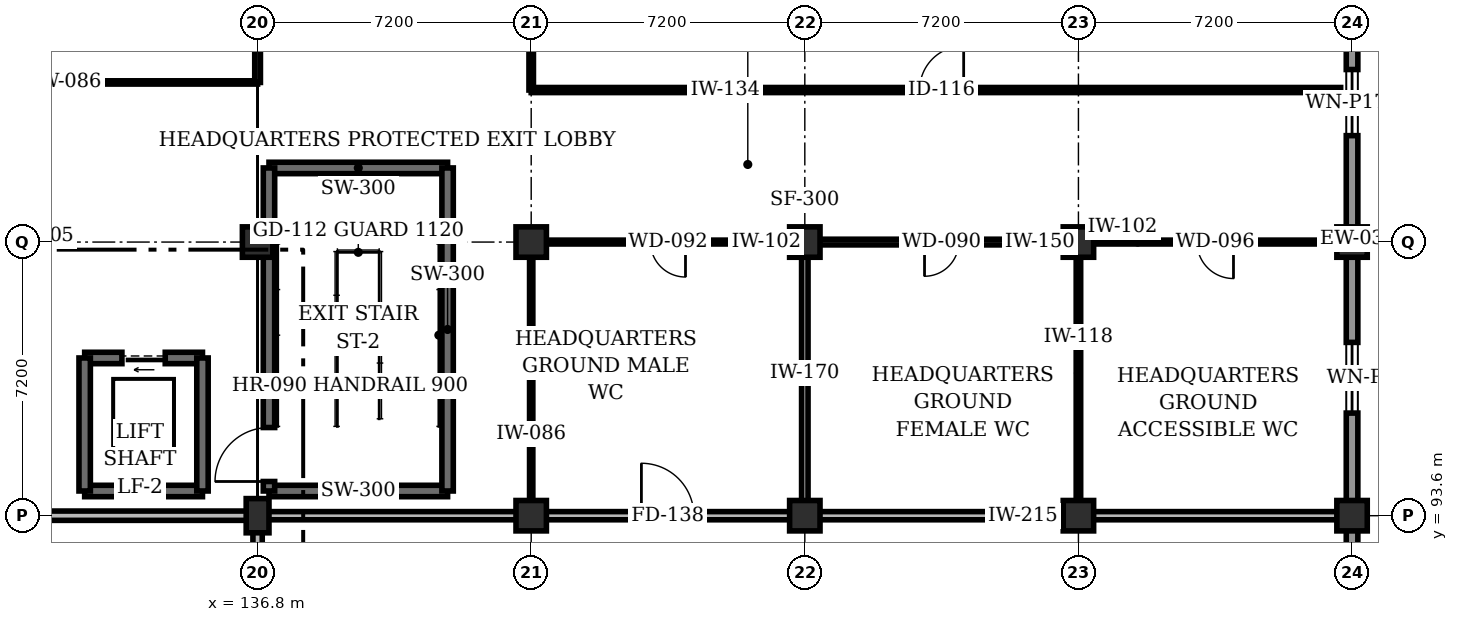
"""IFC4 building model, lengths in metres.
Left out: names, types, materials, properties, quantities, classifications, styles, units other than length and angle.
Written with IfcOpenShell. Run it as: python <this file> out.ifc"""

import sys

from ifc_helpers import new_model, si_unit, direction, frame, frame_2d, origin, origin_2d, place, context, subcontext, project, spatial, rectangle, extrude, element, fill, save


model = new_model("IFC4")
c1 = context("Model", 3, precision=1e-05, world=origin(), true_north=direction((0.0, 1.0)))
c2 = subcontext(c1, "Body", "Model", "MODEL_VIEW")
j1 = project(units=[si_unit("LENGTHUNIT", "METRE"), si_unit("PLANEANGLEUNIT", "RADIAN")], contexts=[c1])
p1 = place(None, origin())
s1 = spatial("IfcSite", under=j1, at=p1, CompositionType="ELEMENT")
p2 = place(p1, origin())
s2 = spatial("IfcBuilding", under=s1, at=p2, CompositionType="ELEMENT")
p3 = place(p2, origin())
s3 = spatial("IfcBuildingStorey", under=s2, at=p3, CompositionType="ELEMENT", Elevation=0.0)
p4 = place(p3, frame((136.8, 93.6, 0.0), z_axis=(0.0, 0.0, 1.0), x_axis=(1.0, 0.0, 0.0)))
e1 = element("IfcColumn", 1, at=p4, inside=s3, PredefinedType="PILASTER", context=c2, shape_type="SweptSolid", body=[
    extrude(rectangle(XDim=0.6, YDim=0.9, at=origin_2d()), origin(), (0.0, 0.0, 1.0), 6.0),
])
for number, where, z_axis, x_axis in (
    (2, (136.8, 100.8, 0.0), (0.0, 0.0, 1.0), (1.0, 0.0, 0.0)),
    (3, (144.0, 93.6, 0.0), (0.0, 0.0, 1.0), (1.0, 0.0, 0.0)),
    (4, (144.0, 100.8, 0.0), (0.0, 0.0, 1.0), (1.0, 0.0, 0.0)),
    (5, (151.2, 93.6, 0.0), (0.0, 0.0, 1.0), (1.0, 0.0, 0.0)),
    (6, (151.2, 100.8, 0.0), (0.0, 0.0, 1.0), (1.0, 0.0, 0.0)),
    (7, (158.4, 93.6, 0.0), (0.0, 0.0, 1.0), (1.0, 0.0, 0.0)),
    (8, (158.4, 100.8, 0.0), (0.0, 0.0, 1.0), (1.0, 0.0, 0.0)),
    (9, (165.6, 93.6, 0.0), (0.0, 0.0, 1.0), (1.0, 0.0, 0.0)),
    (10, (165.6, 100.8, 0.0), (0.0, 0.0, 1.0), (1.0, 0.0, 0.0)),
):
    element("IfcColumn", number, at=place(p3, frame(where, z_axis=z_axis, x_axis=x_axis)), inside=s3, PredefinedType="COLUMN", context=c2, shape_type="SweptSolid", body=[
        extrude(rectangle(XDim=0.8, YDim=0.8, at=origin_2d()), origin(), (0.0, 0.0, 1.0), 6.0),
    ])
p5 = place(p3, frame((165.6, 93.6, 0.0), z_axis=(0.0, 0.0, 1.0), x_axis=(0.0, 1.0, 0.0)))
e11 = element("IfcWall", 11, at=p5, inside=s3, PredefinedType="STANDARD", context=c2, shape_type="SweptSolid", body=[
    extrude(rectangle(XDim=16.6, YDim=0.305, at=frame_2d((8.3, 0.0))), origin(), (0.0, 0.0, 1.0), 5.05),
])
p6 = place(p5, frame((2.7, 0.0, 1.2)))
e12 = element("IfcOpeningElement", 12, at=p6, cuts=e11, PredefinedType="OPENING", context=c2, shape_type="SweptSolid", body=[
    extrude(rectangle(XDim=1.86, YDim=1.68, at=frame_2d((0.93, 0.84))), frame((0.0, 0.162, 0.0), z_axis=(0.0, -1.0, 0.0), x_axis=(1.0, 0.0, 0.0)), (0.0, 0.0, 1.0), 0.325),
])
p7 = place(p5, frame((10.0, 0.0, 1.2)))
e13 = element("IfcOpeningElement", 13, at=p7, cuts=e11, PredefinedType="OPENING", context=c2, shape_type="SweptSolid", body=[
    extrude(rectangle(XDim=1.74, YDim=1.64, at=frame_2d((0.87, 0.82))), frame((0.0, 0.162, 0.0), z_axis=(0.0, -1.0, 0.0), x_axis=(1.0, 0.0, 0.0)), (0.0, 0.0, 1.0), 0.325),
])
p8 = place(p3, frame((165.6, 93.6, 0.0), z_axis=(0.0, 0.0, 1.0), x_axis=(0.0, -1.0, 0.0)))
e14 = element("IfcWall", 14, at=p8, inside=s3, PredefinedType="STANDARD", context=c2, shape_type="SweptSolid", body=[
    extrude(rectangle(XDim=50.4, YDim=0.305, at=frame_2d((25.2, 0.0))), origin(), (0.0, 0.0, 1.0), 5.022),
])
p9 = place(p8, frame((44.78, 0.0, 0.0)))
e15 = element("IfcOpeningElement", 15, at=p9, cuts=e14, PredefinedType="OPENING", context=c2, shape_type="SweptSolid", body=[
    extrude(rectangle(XDim=1.82, YDim=2.34, at=frame_2d((0.91, 1.17))), frame((0.0, 0.162, 0.0), z_axis=(0.0, -1.0, 0.0), x_axis=(1.0, 0.0, 0.0)), (0.0, 0.0, 1.0), 0.325),
])
p10 = place(p8, frame((24.22, 0.0, 0.0)))
e16 = element("IfcOpeningElement", 16, at=p10, cuts=e14, PredefinedType="OPENING", context=c2, shape_type="SweptSolid", body=[
    extrude(rectangle(XDim=1.88, YDim=2.36, at=frame_2d((0.94, 1.18))), frame((0.0, 0.162, 0.0), z_axis=(0.0, -1.0, 0.0), x_axis=(1.0, 0.0, 0.0)), (0.0, 0.0, 1.0), 0.325),
])
p11 = place(p8, frame((38.0, 0.0, 2.2)))
e17 = element("IfcOpeningElement", 17, at=p11, cuts=e14, PredefinedType="OPENING", context=c2, shape_type="SweptSolid", body=[
    extrude(rectangle(XDim=3.2, YDim=1.4, at=frame_2d((1.6, 0.7))), frame((0.0, 0.162, 0.0), z_axis=(0.0, -1.0, 0.0), x_axis=(1.0, 0.0, 0.0)), (0.0, 0.0, 1.0), 0.325),
])
p12 = place(p8, frame((18.68, 0.0, 2.2)))
e18 = element("IfcOpeningElement", 18, at=p12, cuts=e14, PredefinedType="OPENING", context=c2, shape_type="SweptSolid", body=[
    extrude(rectangle(XDim=2.12, YDim=1.76, at=frame_2d((1.06, 0.88))), frame((0.0, 0.162, 0.0), z_axis=(0.0, -1.0, 0.0), x_axis=(1.0, 0.0, 0.0)), (0.0, 0.0, 1.0), 0.325),
])
p13 = place(p8, frame((15.68, 0.0, 2.2)))
e19 = element("IfcOpeningElement", 19, at=p13, cuts=e14, PredefinedType="OPENING", context=c2, shape_type="SweptSolid", body=[
    extrude(rectangle(XDim=2.12, YDim=1.76, at=frame_2d((1.06, 0.88))), frame((0.0, 0.162, 0.0), z_axis=(0.0, -1.0, 0.0), x_axis=(1.0, 0.0, 0.0)), (0.0, 0.0, 1.0), 0.325),
])
p14 = place(p8, frame((4.28, 0.0, 2.2)))
e20 = element("IfcOpeningElement", 20, at=p14, cuts=e14, PredefinedType="OPENING", context=c2, shape_type="SweptSolid", body=[
    extrude(rectangle(XDim=2.12, YDim=1.76, at=frame_2d((1.06, 0.88))), frame((0.0, 0.162, 0.0), z_axis=(0.0, -1.0, 0.0), x_axis=(1.0, 0.0, 0.0)), (0.0, 0.0, 1.0), 0.325),
])
p15 = place(p8, frame((1.28, 0.0, 2.2)))
e21 = element("IfcOpeningElement", 21, at=p15, cuts=e14, PredefinedType="OPENING", context=c2, shape_type="SweptSolid", body=[
    extrude(rectangle(XDim=2.12, YDim=1.76, at=frame_2d((1.06, 0.88))), frame((0.0, 0.162, 0.0), z_axis=(0.0, -1.0, 0.0), x_axis=(1.0, 0.0, 0.0)), (0.0, 0.0, 1.0), 0.325),
])
for number, where, z_axis, x_axis in (
    (22, (137.1, 94.25, 0.0), (0.0, 0.0, 1.0), (1.0, 0.0, 0.0)),
    (23, (141.8, 102.75, 0.0), (0.0, 0.0, 1.0), (-1.0, 0.0, 0.0)),
):
    element("IfcWall", number, at=place(p3, frame(where, z_axis=z_axis, x_axis=x_axis)), inside=s3, PredefinedType="SHEAR", context=c2, shape_type="SweptSolid", body=[
        extrude(rectangle(XDim=4.7, YDim=0.3, at=frame_2d((2.35, 0.0))), origin(), (0.0, 0.0, 1.0), 5.715),
    ])
p16 = place(p3, frame((137.1, 94.25, 0.0), z_axis=(0.0, 0.0, 1.0), x_axis=(0.0, 1.0, 0.0)))
e24 = element("IfcWall", 24, at=p16, inside=s3, PredefinedType="SHEAR", context=c2, shape_type="SweptSolid", body=[
    extrude(rectangle(XDim=8.5, YDim=0.3, at=frame_2d((4.25, 0.0))), origin(), (0.0, 0.0, 1.0), 5.715),
])
p17 = place(p16, frame((0.25, 0.0, 0.0)))
e25 = element("IfcOpeningElement", 25, at=p17, cuts=e24, PredefinedType="OPENING", context=c2, shape_type="SweptSolid", body=[
    extrude(rectangle(XDim=1.42, YDim=2.22, at=frame_2d((0.71, 1.11))), frame((0.0, 0.16, 0.0), z_axis=(0.0, -1.0, 0.0), x_axis=(1.0, 0.0, 0.0)), (0.0, 0.0, 1.0), 0.32),
])
p18 = place(p3, frame((141.8, 102.75, 0.0), z_axis=(0.0, 0.0, 1.0), x_axis=(0.0, -1.0, 0.0)))
e26 = element("IfcWall", 26, at=p18, inside=s3, PredefinedType="SHEAR", context=c2, shape_type="SweptSolid", body=[
    extrude(rectangle(XDim=8.5, YDim=0.3, at=frame_2d((4.25, 0.0))), origin(), (0.0, 0.0, 1.0), 5.715),
])
p19 = place(p3, frame((132.25, 94.25, 0.0), z_axis=(0.0, 0.0, 1.0), x_axis=(1.0, 0.0, 0.0)))
e27 = element("IfcWall", 27, at=p19, inside=s3, PredefinedType="SHEAR", context=c2, shape_type="SweptSolid", body=[
    extrude(rectangle(XDim=3.1, YDim=0.3, at=frame_2d((1.55, 0.0))), origin(), (0.0, 0.0, 1.0), 5.715),
])
p20 = place(p3, frame((135.35, 97.75, 0.0), z_axis=(0.0, 0.0, 1.0), x_axis=(-1.0, 0.0, 0.0)))
e28 = element("IfcWall", 28, at=p20, inside=s3, PredefinedType="SHEAR", context=c2, shape_type="SweptSolid", body=[
    extrude(rectangle(XDim=3.1, YDim=0.3, at=frame_2d((1.55, 0.0))), origin(), (0.0, 0.0, 1.0), 5.715),
])
p21 = place(p20, frame((0.98, 0.0, 0.0)))
e29 = element("IfcOpeningElement", 29, at=p21, cuts=e28, PredefinedType="OPENING", context=c2, shape_type="SweptSolid", body=[
    extrude(rectangle(XDim=1.14, YDim=2.24, at=frame_2d((0.57, 1.12))), frame((0.0, 0.16, 0.0), z_axis=(0.0, -1.0, 0.0), x_axis=(1.0, 0.0, 0.0)), (0.0, 0.0, 1.0), 0.32),
])
for number, where, z_axis, x_axis in (
    (30, (132.25, 97.75, 0.0), (0.0, 0.0, 1.0), (0.0, -1.0, 0.0)),
    (31, (135.35, 94.25, 0.0), (0.0, 0.0, 1.0), (0.0, 1.0, 0.0)),
):
    element("IfcWall", number, at=place(p3, frame(where, z_axis=z_axis, x_axis=x_axis)), inside=s3, PredefinedType="SHEAR", context=c2, shape_type="SweptSolid", body=[
        extrude(rectangle(XDim=3.5, YDim=0.3, at=frame_2d((1.75, 0.0))), origin(), (0.0, 0.0, 1.0), 5.715),
    ])
p22 = place(p3, frame((115.2, 93.6, 0.0), z_axis=(0.0, 0.0, 1.0), x_axis=(1.0, 0.0, 0.0)))
e32 = element("IfcWall", 32, at=p22, inside=s3, PredefinedType="STANDARD", context=c2, shape_type="SweptSolid", body=[
    extrude(rectangle(XDim=21.6, YDim=0.245, at=frame_2d((10.8, 0.0))), origin(), (0.0, 0.0, 1.0), 5.022),
])
p23 = place(p22, frame((11.32, 0.0, 0.0)))
e33 = element("IfcOpeningElement", 33, at=p23, cuts=e32, PredefinedType="OPENING", context=c2, shape_type="SweptSolid", body=[
    extrude(rectangle(XDim=1.52, YDim=2.26, at=frame_2d((0.76, 1.13))), frame((0.0, 0.133, 0.0), z_axis=(0.0, -1.0, 0.0), x_axis=(1.0, 0.0, 0.0)), (0.0, 0.0, 1.0), 0.265),
])
p24 = place(p3, frame((136.8, 57.6, 0.0), z_axis=(0.0, 0.0, 1.0), x_axis=(0.0, 1.0, 0.0)))
e34 = element("IfcWall", 34, at=p24, inside=s3, PredefinedType="STANDARD", context=c2, shape_type="SweptSolid", body=[
    extrude(rectangle(XDim=36.0, YDim=0.245, at=frame_2d((18.0, 0.0))), origin(), (0.0, 0.0, 1.0), 5.022),
])
p25 = place(p24, frame((9.97, 0.0, 0.0)))
e35 = element("IfcOpeningElement", 35, at=p25, cuts=e34, PredefinedType="OPENING", context=c2, shape_type="SweptSolid", body=[
    extrude(rectangle(XDim=1.66, YDim=2.3, at=frame_2d((0.83, 1.15))), frame((0.0, 0.133, 0.0), z_axis=(0.0, -1.0, 0.0), x_axis=(1.0, 0.0, 0.0)), (0.0, 0.0, 1.0), 0.265),
])
p26 = place(p3, frame((136.8, 93.6, 0.0), z_axis=(0.0, 0.0, 1.0), x_axis=(1.0, 0.0, 0.0)))
e36 = element("IfcWall", 36, at=p26, inside=s3, PredefinedType="STANDARD", context=c2, shape_type="SweptSolid", body=[
    extrude(rectangle(XDim=28.8, YDim=0.215, at=frame_2d((14.4, 0.0))), origin(), (0.0, 0.0, 1.0), 5.022),
])
p27 = place(p26, frame((10.1, 0.0, 0.0)))
e37 = element("IfcOpeningElement", 37, at=p27, cuts=e36, PredefinedType="OPENING", context=c2, shape_type="SweptSolid", body=[
    extrude(rectangle(XDim=1.38, YDim=2.24, at=frame_2d((0.69, 1.12))), frame((0.0, 0.117, 0.0), z_axis=(0.0, -1.0, 0.0), x_axis=(1.0, 0.0, 0.0)), (0.0, 0.0, 1.0), 0.235),
])
p28 = place(p3, frame((122.4, 105.0, 0.0), z_axis=(0.0, 0.0, 1.0), x_axis=(1.0, 0.0, 0.0)))
e38 = element("IfcWall", 38, at=p28, inside=s3, PredefinedType="STANDARD", context=c2, shape_type="SweptSolid", body=[
    extrude(rectangle(XDim=14.4, YDim=0.086, at=frame_2d((7.2, 0.0))), origin(), (0.0, 0.0, 1.0), 5.103),
])
p29 = place(p28, frame((2.85, 0.0, 0.0)))
e39 = element("IfcOpeningElement", 39, at=p29, cuts=e38, PredefinedType="OPENING", context=c2, shape_type="SweptSolid", body=[
    extrude(rectangle(XDim=1.5, YDim=2.26, at=frame_2d((0.75, 1.13))), frame((0.0, 0.053, 0.0), z_axis=(0.0, -1.0, 0.0), x_axis=(1.0, 0.0, 0.0)), (0.0, 0.0, 1.0), 0.106),
])
p30 = place(p3, frame((136.8, 105.0, 0.0), z_axis=(0.0, 0.0, 1.0), x_axis=(0.0, 1.0, 0.0)))
e40 = element("IfcWall", 40, at=p30, inside=s3, PredefinedType="STANDARD", context=c2, shape_type="SweptSolid", body=[
    extrude(rectangle(XDim=4.9, YDim=0.15, at=frame_2d((2.45, 0.0))), origin(), (0.0, 0.0, 1.0), 5.022),
])
p31 = place(p3, frame((144.0, 104.8, 0.0), z_axis=(0.0, 0.0, 1.0), x_axis=(1.0, 0.0, 0.0)))
e41 = element("IfcWall", 41, at=p31, inside=s3, PredefinedType="STANDARD", context=c2, shape_type="SweptSolid", body=[
    extrude(rectangle(XDim=21.3, YDim=0.134, at=frame_2d((10.65, 0.0))), origin(), (0.0, 0.0, 1.0), 5.103),
])
p32 = place(p31, frame((10.22, 0.0, 0.0)))
e42 = element("IfcOpeningElement", 42, at=p32, cuts=e41, PredefinedType="OPENING", context=c2, shape_type="SweptSolid", body=[
    extrude(rectangle(XDim=1.16, YDim=2.22, at=frame_2d((0.58, 1.11))), frame((0.0, 0.077, 0.0), z_axis=(0.0, -1.0, 0.0), x_axis=(1.0, 0.0, 0.0)), (0.0, 0.0, 1.0), 0.154),
])
p33 = place(p3, frame((144.0, 109.9, 0.0), z_axis=(0.0, 0.0, 1.0), x_axis=(0.0, -1.0, 0.0)))
e43 = element("IfcWall", 43, at=p33, inside=s3, PredefinedType="STANDARD", context=c2, shape_type="SweptSolid", body=[
    extrude(rectangle(XDim=5.1, YDim=0.118, at=frame_2d((2.55, 0.0))), origin(), (0.0, 0.0, 1.0), 5.022),
])
p34 = place(p3, frame((151.2, 100.8, 0.0), z_axis=(0.0, 0.0, 1.0), x_axis=(-1.0, 0.0, 0.0)))
e44 = element("IfcWall", 44, at=p34, inside=s3, PredefinedType="STANDARD", context=c2, shape_type="SweptSolid", body=[
    extrude(rectangle(XDim=7.2, YDim=0.102, at=frame_2d((3.6, 0.0))), origin(), (0.0, 0.0, 1.0), 5.022),
])
p35 = place(p34, frame((3.14, 0.0, 0.0)))
e45 = element("IfcOpeningElement", 45, at=p35, cuts=e44, PredefinedType="OPENING", context=c2, shape_type="SweptSolid", body=[
    extrude(rectangle(XDim=0.92, YDim=2.1, at=frame_2d((0.46, 1.05))), frame((0.0, 0.061, 0.0), z_axis=(0.0, -1.0, 0.0), x_axis=(1.0, 0.0, 0.0)), (0.0, 0.0, 1.0), 0.122),
])
p36 = place(p3, frame((144.0, 100.8, 0.0), z_axis=(0.0, 0.0, 1.0), x_axis=(0.0, -1.0, 0.0)))
e46 = element("IfcWall", 46, at=p36, inside=s3, PredefinedType="STANDARD", context=c2, shape_type="SweptSolid", body=[
    extrude(rectangle(XDim=6.9, YDim=0.086, at=frame_2d((3.45, 0.0))), origin(), (0.0, 0.0, 1.0), 5.022),
])
p37 = place(p3, frame((151.2, 93.9, 0.0), z_axis=(0.0, 0.0, 1.0), x_axis=(0.0, 1.0, 0.0)))
e47 = element("IfcWall", 47, at=p37, inside=s3, PredefinedType="STANDARD", context=c2, shape_type="SweptSolid", body=[
    extrude(rectangle(XDim=6.9, YDim=0.17, at=frame_2d((3.45, 0.0))), origin(), (0.0, 0.0, 1.0), 5.022),
])
p38 = place(p3, frame((158.4, 100.8, 0.0), z_axis=(0.0, 0.0, 1.0), x_axis=(-1.0, 0.0, 0.0)))
e48 = element("IfcWall", 48, at=p38, inside=s3, PredefinedType="STANDARD", context=c2, shape_type="SweptSolid", body=[
    extrude(rectangle(XDim=7.2, YDim=0.15, at=frame_2d((3.6, 0.0))), origin(), (0.0, 0.0, 1.0), 5.022),
])
p39 = place(p38, frame((3.15, 0.0, 0.0)))
e49 = element("IfcOpeningElement", 49, at=p39, cuts=e48, PredefinedType="OPENING", context=c2, shape_type="SweptSolid", body=[
    extrude(rectangle(XDim=0.9, YDim=2.1, at=frame_2d((0.45, 1.05))), frame((0.0, 0.085, 0.0), z_axis=(0.0, -1.0, 0.0), x_axis=(1.0, 0.0, 0.0)), (0.0, 0.0, 1.0), 0.17),
])
p40 = place(p3, frame((158.4, 93.9, 0.0), z_axis=(0.0, 0.0, 1.0), x_axis=(0.0, 1.0, 0.0)))
e50 = element("IfcWall", 50, at=p40, inside=s3, PredefinedType="STANDARD", context=c2, shape_type="SweptSolid", body=[
    extrude(rectangle(XDim=6.9, YDim=0.118, at=frame_2d((3.45, 0.0))), origin(), (0.0, 0.0, 1.0), 5.022),
])
p41 = place(p3, frame((165.3, 100.8, 0.0), z_axis=(0.0, 0.0, 1.0), x_axis=(-1.0, 0.0, 0.0)))
e51 = element("IfcWall", 51, at=p41, inside=s3, PredefinedType="STANDARD", context=c2, shape_type="SweptSolid", body=[
    extrude(rectangle(XDim=6.9, YDim=0.102, at=frame_2d((3.45, 0.0))), origin(), (0.0, 0.0, 1.0), 5.022),
])
p42 = place(p41, frame((2.82, 0.0, 0.0)))
e52 = element("IfcOpeningElement", 52, at=p42, cuts=e51, PredefinedType="OPENING", context=c2, shape_type="SweptSolid", body=[
    extrude(rectangle(XDim=0.96, YDim=2.1, at=frame_2d((0.48, 1.05))), frame((0.0, 0.061, 0.0), z_axis=(0.0, -1.0, 0.0), x_axis=(1.0, 0.0, 0.0)), (0.0, 0.0, 1.0), 0.122),
])
p43 = place(p6, origin())
e53 = element("IfcWindow", 53, at=p43, inside=s3, PartitioningType="SINGLE_PANEL", PredefinedType="WINDOW", context=c2, shape_type="SweptSolid", body=[
    extrude(rectangle(XDim=1.86, YDim=1.68, at=frame_2d((0.93, 0.84))), frame((0.0, 0.03, 0.0), z_axis=(0.0, -1.0, 0.0), x_axis=(1.0, 0.0, 0.0)), (0.0, 0.0, 1.0), 0.06),
])
fill(e12, e53)
p44 = place(p7, origin())
e54 = element("IfcWindow", 54, at=p44, inside=s3, PartitioningType="SINGLE_PANEL", PredefinedType="WINDOW", context=c2, shape_type="SweptSolid", body=[
    extrude(rectangle(XDim=1.74, YDim=1.64, at=frame_2d((0.87, 0.82))), frame((0.0, 0.03, 0.0), z_axis=(0.0, -1.0, 0.0), x_axis=(1.0, 0.0, 0.0)), (0.0, 0.0, 1.0), 0.06),
])
fill(e13, e54)
p45 = place(p17, origin())
e55 = element("IfcDoor", 55, at=p45, inside=s3, OperationType="SINGLE_SWING_LEFT", PredefinedType="DOOR", context=c2, shape_type="SweptSolid", body=[
    extrude(rectangle(XDim=1.42, YDim=2.22, at=frame_2d((0.71, 1.11))), frame((0.0, 0.025, 0.0), z_axis=(0.0, -1.0, 0.0), x_axis=(1.0, 0.0, 0.0)), (0.0, 0.0, 1.0), 0.05),
])
fill(e25, e55)
p46 = place(p21, origin())
e56 = element("IfcDoor", 56, at=p46, inside=s3, OperationType="SLIDING_TO_LEFT", PredefinedType="DOOR", context=c2, shape_type="SweptSolid", body=[
    extrude(rectangle(XDim=1.14, YDim=2.24, at=frame_2d((0.57, 1.12))), frame((0.0, 0.025, 0.0), z_axis=(0.0, -1.0, 0.0), x_axis=(1.0, 0.0, 0.0)), (0.0, 0.0, 1.0), 0.05),
])
fill(e29, e56)
p47 = place(p27, origin())
e57 = element("IfcDoor", 57, at=p47, inside=s3, OperationType="SINGLE_SWING_LEFT", PredefinedType="DOOR", context=c2, shape_type="SweptSolid", body=[
    extrude(rectangle(XDim=1.38, YDim=2.24, at=frame_2d((0.69, 1.12))), frame((0.0, 0.025, 0.0), z_axis=(0.0, -1.0, 0.0), x_axis=(1.0, 0.0, 0.0)), (0.0, 0.0, 1.0), 0.05),
])
fill(e37, e57)
p48 = place(p32, origin())
e58 = element("IfcDoor", 58, at=p48, inside=s3, OperationType="SINGLE_SWING_RIGHT", PredefinedType="DOOR", context=c2, shape_type="SweptSolid", body=[
    extrude(rectangle(XDim=1.16, YDim=2.22, at=frame_2d((0.58, 1.11))), frame((0.0, 0.025, 0.0), z_axis=(0.0, -1.0, 0.0), x_axis=(1.0, 0.0, 0.0)), (0.0, 0.0, 1.0), 0.05),
])
fill(e42, e58)
p49 = place(p35, origin())
e59 = element("IfcDoor", 59, at=p49, inside=s3, OperationType="SINGLE_SWING_LEFT", PredefinedType="DOOR", context=c2, shape_type="SweptSolid", body=[
    extrude(rectangle(XDim=0.92, YDim=2.1, at=frame_2d((0.46, 1.05))), frame((0.0, 0.025, 0.0), z_axis=(0.0, -1.0, 0.0), x_axis=(1.0, 0.0, 0.0)), (0.0, 0.0, 1.0), 0.05),
])
fill(e45, e59)
p50 = place(p39, origin())
e60 = element("IfcDoor", 60, at=p50, inside=s3, OperationType="SINGLE_SWING_RIGHT", PredefinedType="DOOR", context=c2, shape_type="SweptSolid", body=[
    extrude(rectangle(XDim=0.9, YDim=2.1, at=frame_2d((0.45, 1.05))), frame((0.0, 0.025, 0.0), z_axis=(0.0, -1.0, 0.0), x_axis=(1.0, 0.0, 0.0)), (0.0, 0.0, 1.0), 0.05),
])
fill(e49, e60)
p51 = place(p42, origin())
e61 = element("IfcDoor", 61, at=p51, inside=s3, OperationType="SINGLE_SWING_LEFT", PredefinedType="DOOR", context=c2, shape_type="SweptSolid", body=[
    extrude(rectangle(XDim=0.96, YDim=2.1, at=frame_2d((0.48, 1.05))), frame((0.0, 0.025, 0.0), z_axis=(0.0, -1.0, 0.0), x_axis=(1.0, 0.0, 0.0)), (0.0, 0.0, 1.0), 0.05),
])
fill(e52, e61)
save(model, sys.argv[1])
